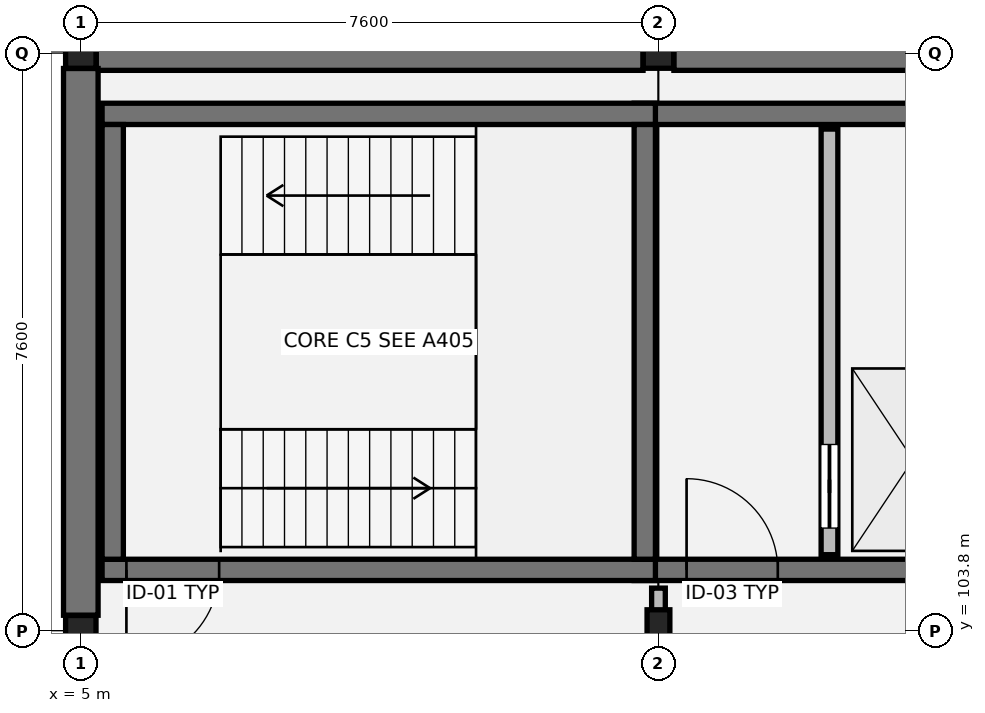
"""IFC4 building model, lengths in metres.
Left out: names, types, materials, properties, quantities, classifications, styles, units other than length and angle.
Written with IfcOpenShell. Run it as: python <this file> out.ifc"""

import sys

from ifc_helpers import new_model, si_unit, direction, frame, frame_2d, origin, origin_2d, place, context, subcontext, project, spatial, rectangle, hollow_rectangle, i_section, extrude, element, fill, save


model = new_model("IFC4")
c1 = context("Model", 3, precision=1e-05, world=origin(), true_north=direction((0.0, 1.0)))
c2 = subcontext(c1, "Body", "Model", "MODEL_VIEW")
j1 = project(units=[si_unit("LENGTHUNIT", "METRE"), si_unit("PLANEANGLEUNIT", "RADIAN")], contexts=[c1])
p1 = place(None, origin())
s1 = spatial("IfcSite", under=j1, at=p1, CompositionType="ELEMENT")
p2 = place(p1, origin())
s2 = spatial("IfcBuilding", under=s1, at=p2, CompositionType="ELEMENT")
p3 = place(p2, frame((0.0, 0.0, -4.42)))
s3 = spatial("IfcBuildingStorey", under=s2, at=p3, CompositionType="ELEMENT", Elevation=-4.42)
for number, where, z_axis, x_axis in (
    (1, (5.0, 103.8, 0.0), (0.0, 0.0, 1.0), (1.0, 0.0, 0.0)),
    (2, (5.0, 111.4, 0.0), (0.0, 0.0, 1.0), (1.0, 0.0, 0.0)),
):
    element("IfcColumn", number, at=place(p3, frame(where, z_axis=z_axis, x_axis=x_axis)), inside=s3, PredefinedType="COLUMN", context=c2, shape_type="SweptSolid", body=[
        extrude(hollow_rectangle(XDim=0.4, YDim=0.4, WallThickness=0.016, at=origin_2d()), origin(), (0.0, 0.0, 1.0), 4.395),
    ])
p4 = place(p3, frame((12.6, 103.8, 0.0), z_axis=(0.0, 0.0, 1.0), x_axis=(1.0, 0.0, 0.0)))
e3 = element("IfcColumn", 3, at=p4, inside=s3, PredefinedType="COLUMN", context=c2, shape_type="SweptSolid", body=[
    extrude(i_section(OverallWidth=0.3, OverallDepth=0.55, WebThickness=0.015, FlangeThickness=0.029, at=origin_2d()), origin(), (0.0, 0.0, 1.0), 4.395),
])
p5 = place(p3, frame((12.6, 111.4, 0.0), z_axis=(0.0, 0.0, 1.0), x_axis=(1.0, 0.0, 0.0)))
e4 = element("IfcColumn", 4, at=p5, inside=s3, PredefinedType="COLUMN", context=c2, shape_type="SweptSolid", body=[
    extrude(hollow_rectangle(XDim=0.4, YDim=0.4, WallThickness=0.016, at=origin_2d()), origin(), (0.0, 0.0, 1.0), 4.395),
])
for number, where, z_axis, x_axis in (
    (5, (5.203, 111.4, 0.0), (0.0, 0.0, 1.0), (1.0, 0.0, 0.0)),
    (6, (12.803, 111.4, 0.0), (0.0, 0.0, 1.0), (1.0, 0.0, 0.0)),
    (7, (5.0, 104.003, 0.0), (0.0, 0.0, 1.0), (0.0, 1.0, 0.0)),
):
    element("IfcWall", number, at=place(p3, frame(where, z_axis=z_axis, x_axis=x_axis)), inside=s3, PredefinedType="USERDEFINED", context=c2, shape_type="SweptSolid", body=[
        extrude(rectangle(XDim=7.194, YDim=0.455, at=frame_2d((3.597, 0.0))), origin(), (0.0, 0.0, 1.0), 3.82),
    ])
p6 = place(p3, frame((12.28, 104.6, 0.0), z_axis=(0.0, 0.0, 1.0), x_axis=(1.0, 0.0, 0.0)))
e8 = element("IfcWall", 8, at=p6, inside=s3, PredefinedType="SHEAR", context=c2, shape_type="SweptSolid", body=[
    extrude(rectangle(XDim=4.96, YDim=0.28, at=frame_2d((2.48, 0.0))), origin(), (0.0, 0.0, 1.0), 4.185),
])
p7 = place(p6, frame((0.69, 0.0, 0.0)))
e9 = element("IfcOpeningElement", 9, at=p7, cuts=e8, PredefinedType="OPENING", context=c2, shape_type="SweptSolid", body=[
    extrude(rectangle(XDim=1.2, YDim=2.16, at=frame_2d((0.6, 1.08))), frame((0.0, 0.15, 0.0), z_axis=(0.0, -1.0, 0.0), x_axis=(1.0, 0.0, 0.0)), (0.0, 0.0, 1.0), 0.3),
])
p8 = place(p3, frame((17.24, 110.6, 0.0), z_axis=(0.0, 0.0, 1.0), x_axis=(-1.0, 0.0, 0.0)))
e10 = element("IfcWall", 10, at=p8, inside=s3, PredefinedType="SHEAR", context=c2, shape_type="SweptSolid", body=[
    extrude(rectangle(XDim=4.96, YDim=0.28, at=frame_2d((2.48, 0.0))), origin(), (0.0, 0.0, 1.0), 4.185),
])
p9 = place(p3, frame((14.85, 104.8, 0.0), z_axis=(0.0, 0.0, 1.0), x_axis=(0.0, 1.0, 0.0)))
e11 = element("IfcWall", 11, at=p9, inside=s3, PredefinedType="SOLIDWALL", context=c2, shape_type="SweptSolid", body=[
    extrude(rectangle(XDim=5.6, YDim=0.22, at=frame_2d((2.8, 0.0))), origin(), (0.0, 0.0, 1.0), 4.185),
])
p10 = place(p9, frame((0.35, 0.0, 0.0)))
e12 = element("IfcOpeningElement", 12, at=p10, cuts=e11, PredefinedType="OPENING", context=c2, shape_type="SweptSolid", body=[
    extrude(rectangle(XDim=1.1, YDim=2.15, at=frame_2d((0.55, 1.075))), frame((0.0, 0.12, 0.0), z_axis=(0.0, -1.0, 0.0), x_axis=(1.0, 0.0, 0.0)), (0.0, 0.0, 1.0), 0.24),
])
p11 = place(p3, frame((5.28, 104.6, 0.0), z_axis=(0.0, 0.0, 1.0), x_axis=(1.0, 0.0, 0.0)))
e13 = element("IfcWall", 13, at=p11, inside=s3, PredefinedType="SHEAR", context=c2, shape_type="SweptSolid", body=[
    extrude(rectangle(XDim=7.28, YDim=0.28, at=frame_2d((3.64, 0.0))), origin(), (0.0, 0.0, 1.0), 4.185),
])
p12 = place(p11, frame((0.32, 0.0, 0.0)))
e14 = element("IfcOpeningElement", 14, at=p12, cuts=e13, PredefinedType="OPENING", context=c2, shape_type="SweptSolid", body=[
    extrude(rectangle(XDim=1.22, YDim=2.18, at=frame_2d((0.61, 1.09))), frame((0.0, 0.15, 0.0), z_axis=(0.0, -1.0, 0.0), x_axis=(1.0, 0.0, 0.0)), (0.0, 0.0, 1.0), 0.3),
])
p13 = place(p3, frame((5.28, 110.6, 0.0), z_axis=(0.0, 0.0, 1.0), x_axis=(1.0, 0.0, 0.0)))
e15 = element("IfcWall", 15, at=p13, inside=s3, PredefinedType="SHEAR", context=c2, shape_type="SweptSolid", body=[
    extrude(rectangle(XDim=7.28, YDim=0.28, at=frame_2d((3.64, 0.0))), origin(), (0.0, 0.0, 1.0), 4.185),
])
for number, where, z_axis, x_axis in (
    (16, (5.42, 104.74, 0.0), (0.0, 0.0, 1.0), (0.0, 1.0, 0.0)),
    (17, (12.42, 104.74, 0.0), (0.0, 0.0, 1.0), (0.0, 1.0, 0.0)),
):
    element("IfcWall", number, at=place(p3, frame(where, z_axis=z_axis, x_axis=x_axis)), inside=s3, PredefinedType="SHEAR", context=c2, shape_type="SweptSolid", body=[
        extrude(rectangle(XDim=5.72, YDim=0.28, at=frame_2d((2.86, 0.0))), origin(), (0.0, 0.0, 1.0), 4.185),
    ])
p14 = place(p3, frame((12.6, 104.04, 0.0), z_axis=(0.0, 0.0, 1.0), x_axis=(0.0, 1.0, 0.0)))
e18 = element("IfcWall", 18, at=p14, inside=s3, PredefinedType="PARTITIONING", context=c2, shape_type="SweptSolid", body=[
    extrude(rectangle(XDim=0.32, YDim=0.18, at=frame_2d((0.16, 0.0))), origin(), (0.0, 0.0, 1.0), 3.52),
])
p15 = place(p7, origin())
e19 = element("IfcDoor", 19, at=p15, inside=s3, OperationType="SINGLE_SWING_LEFT", PredefinedType="DOOR", context=c2, shape_type="SweptSolid", body=[
    extrude(rectangle(XDim=1.2, YDim=2.16, at=frame_2d((0.6, 1.08))), frame((0.0, 0.025, 0.0), z_axis=(0.0, -1.0, 0.0), x_axis=(1.0, 0.0, 0.0)), (0.0, 0.0, 1.0), 0.05),
])
fill(e9, e19)
p16 = place(p10, origin())
e20 = element("IfcDoor", 20, at=p16, inside=s3, OperationType="SLIDING_TO_LEFT", PredefinedType="DOOR", context=c2, shape_type="SweptSolid", body=[
    extrude(rectangle(XDim=1.1, YDim=2.15, at=frame_2d((0.55, 1.075))), frame((0.0, 0.025, 0.0), z_axis=(0.0, -1.0, 0.0), x_axis=(1.0, 0.0, 0.0)), (0.0, 0.0, 1.0), 0.05),
])
fill(e12, e20)
p17 = place(p12, origin())
e21 = element("IfcDoor", 21, at=p17, inside=s3, OperationType="SINGLE_SWING_RIGHT", PredefinedType="DOOR", context=c2, shape_type="SweptSolid", body=[
    extrude(rectangle(XDim=1.22, YDim=2.18, at=frame_2d((0.61, 1.09))), frame((0.0, 0.025, 0.0), z_axis=(0.0, -1.0, 0.0), x_axis=(1.0, 0.0, 0.0)), (0.0, 0.0, 1.0), 0.05),
])
fill(e14, e21)
save(model, sys.argv[1])
